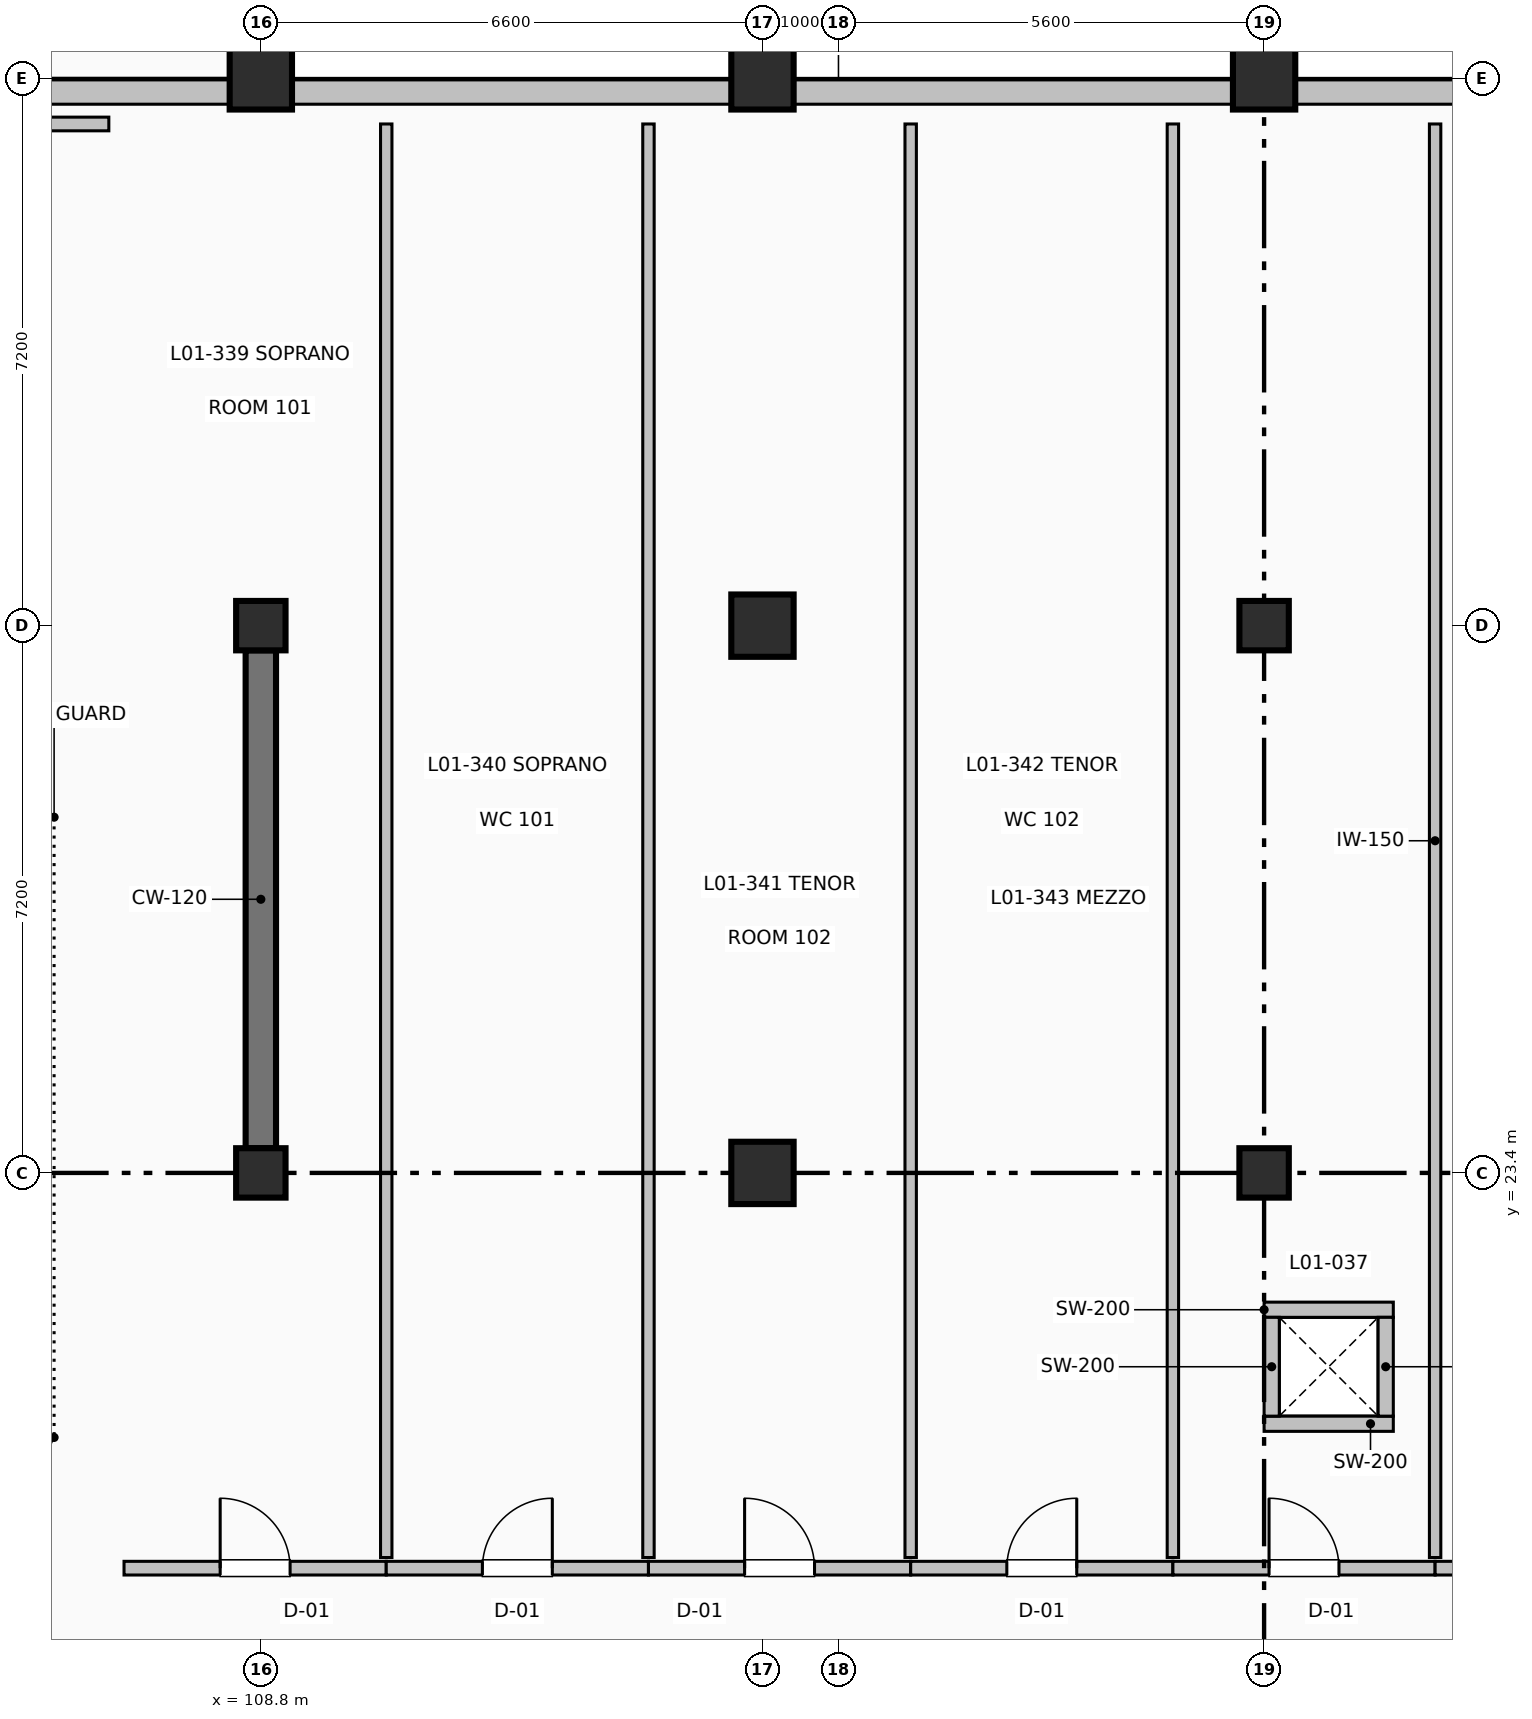
"""IFC4 building model, lengths in metres.
Left out: names, types, materials, properties, quantities, classifications, styles, units other than length and angle.
Written with IfcOpenShell. Run it as: python <this file> out.ifc"""

import sys

from ifc_helpers import new_model, si_unit, direction, frame, frame_2d, origin, origin_2d, place, context, subcontext, project, spatial, rectangle, extrude, element, fill, save


model = new_model("IFC4")
c1 = context("Model", 3, precision=1e-05, world=origin(), true_north=direction((0.0, 1.0)))
c2 = subcontext(c1, "Body", "Model", "MODEL_VIEW")
j1 = project(units=[si_unit("LENGTHUNIT", "METRE"), si_unit("PLANEANGLEUNIT", "RADIAN")], contexts=[c1])
p1 = place(None, origin())
s1 = spatial("IfcSite", under=j1, at=p1, CompositionType="ELEMENT")
p2 = place(p1, origin())
s2 = spatial("IfcBuilding", under=s1, at=p2, CompositionType="ELEMENT")
p3 = place(p2, frame((0.0, 0.0, 5.4)))
s3 = spatial("IfcBuildingStorey", under=s2, at=p3, CompositionType="ELEMENT", Elevation=5.4)
for number, where, z_axis, x_axis in (
    (1, (108.8, 23.4, 0.0), (0.0, 0.0, 1.0), (1.0, 0.0, 0.0)),
    (2, (108.8, 30.6, 0.0), (0.0, 0.0, 1.0), (1.0, 0.0, 0.0)),
):
    element("IfcColumn", number, at=place(p3, frame(where, z_axis=z_axis, x_axis=x_axis)), inside=s3, PredefinedType="COLUMN", context=c2, shape_type="SweptSolid", body=[
        extrude(rectangle(XDim=0.65, YDim=0.65, at=origin_2d()), origin(), (0.0, 0.0, 1.0), 4.8),
    ])
for number, where, z_axis, x_axis in (
    (3, (108.8, 37.8, 0.0), (0.0, 0.0, 1.0), (1.0, 0.0, 0.0)),
    (4, (115.4, 23.4, 0.0), (0.0, 0.0, 1.0), (1.0, 0.0, 0.0)),
    (5, (115.4, 30.6, 0.0), (0.0, 0.0, 1.0), (1.0, 0.0, 0.0)),
    (6, (115.4, 37.8, 0.0), (0.0, 0.0, 1.0), (1.0, 0.0, 0.0)),
):
    element("IfcColumn", number, at=place(p3, frame(where, z_axis=z_axis, x_axis=x_axis)), inside=s3, PredefinedType="COLUMN", context=c2, shape_type="SweptSolid", body=[
        extrude(rectangle(XDim=0.82, YDim=0.82, at=origin_2d()), origin(), (0.0, 0.0, 1.0), 4.8),
    ])
for number, where, z_axis, x_axis in (
    (7, (122.0, 23.4, 0.0), (0.0, 0.0, 1.0), (1.0, 0.0, 0.0)),
    (8, (122.0, 30.6, 0.0), (0.0, 0.0, 1.0), (1.0, 0.0, 0.0)),
):
    element("IfcColumn", number, at=place(p3, frame(where, z_axis=z_axis, x_axis=x_axis)), inside=s3, PredefinedType="COLUMN", context=c2, shape_type="SweptSolid", body=[
        extrude(rectangle(XDim=0.65, YDim=0.65, at=origin_2d()), origin(), (0.0, 0.0, 1.0), 4.8),
    ])
p4 = place(p3, frame((122.0, 37.8, 0.0), z_axis=(0.0, 0.0, 1.0), x_axis=(1.0, 0.0, 0.0)))
e9 = element("IfcColumn", 9, at=p4, inside=s3, PredefinedType="COLUMN", context=c2, shape_type="SweptSolid", body=[
    extrude(rectangle(XDim=0.82, YDim=0.82, at=origin_2d()), origin(), (0.0, 0.0, 1.0), 4.8),
])
p5 = place(p3, frame((108.8, 23.725, 0.0), z_axis=(0.0, 0.0, 1.0), x_axis=(0.0, 1.0, 0.0)))
e10 = element("IfcWall", 10, at=p5, inside=s3, PredefinedType="SHEAR", context=c2, shape_type="SweptSolid", body=[
    extrude(rectangle(XDim=6.55, YDim=0.4, at=frame_2d((3.275, 0.0))), origin(), (0.0, 0.0, 1.0), 4.48),
])
p6 = place(p3, frame((102.61, 37.62, 0.0), z_axis=(0.0, 0.0, 1.0), x_axis=(1.0, 0.0, 0.0)))
e11 = element("IfcWall", 11, at=p6, inside=s3, PredefinedType="SOLIDWALL", context=c2, shape_type="SweptSolid", body=[
    extrude(rectangle(XDim=5.78, YDim=0.32, at=frame_2d((2.89, 0.0))), origin(), (0.0, 0.0, 1.0), 3.742),
])
for number, where, z_axis, x_axis in (
    (12, (109.21, 37.62, 0.0), (0.0, 0.0, 1.0), (1.0, 0.0, 0.0)),
    (13, (115.81, 37.62, 0.0), (0.0, 0.0, 1.0), (1.0, 0.0, 0.0)),
    (14, (122.41, 37.62, 0.0), (0.0, 0.0, 1.0), (1.0, 0.0, 0.0)),
):
    element("IfcWall", number, at=place(p3, frame(where, z_axis=z_axis, x_axis=x_axis)), inside=s3, PredefinedType="SOLIDWALL", context=c2, shape_type="SweptSolid", body=[
        extrude(rectangle(XDim=5.78, YDim=0.32, at=frame_2d((2.89, 0.0))), origin(), (0.0, 0.0, 1.0), 3.742),
    ])
for number, where, z_axis, x_axis in (
    (15, (122.0, 20.1, 0.0), (0.0, 0.0, 1.0), (1.0, 0.0, 0.0)),
    (16, (123.7, 21.6, 0.0), (0.0, 0.0, 1.0), (-1.0, 0.0, 0.0)),
):
    element("IfcWall", number, at=place(p3, frame(where, z_axis=z_axis, x_axis=x_axis)), inside=s3, PredefinedType="PARTITIONING", context=c2, shape_type="SweptSolid", body=[
        extrude(rectangle(XDim=1.7, YDim=0.2, at=frame_2d((0.85, 0.0))), origin(), (0.0, 0.0, 1.0), 4.5),
    ])
p7 = place(p3, frame((122.1, 20.2, 0.0), z_axis=(0.0, 0.0, 1.0), x_axis=(0.0, 1.0, 0.0)))
e17 = element("IfcWall", 17, at=p7, inside=s3, PredefinedType="PARTITIONING", context=c2, shape_type="SweptSolid", body=[
    extrude(rectangle(XDim=1.3, YDim=0.2, at=frame_2d((0.65, 0.0))), origin(), (0.0, 0.0, 1.0), 3.742),
])
p8 = place(p3, frame((123.6, 21.5, 0.0), z_axis=(0.0, 0.0, 1.0), x_axis=(0.0, -1.0, 0.0)))
e18 = element("IfcWall", 18, at=p8, inside=s3, PredefinedType="PARTITIONING", context=c2, shape_type="SweptSolid", body=[
    extrude(rectangle(XDim=1.3, YDim=0.2, at=frame_2d((0.65, 0.0))), origin(), (0.0, 0.0, 1.0), 4.5),
])
p9 = place(p3, frame((89.6, 37.2, 0.0), z_axis=(0.0, 0.0, 1.0), x_axis=(1.0, 0.0, 0.0)))
e19 = element("IfcWall", 19, at=p9, inside=s3, PredefinedType="PARTITIONING", context=c2, shape_type="SweptSolid", body=[
    extrude(rectangle(XDim=17.2, YDim=0.18, at=frame_2d((8.6, 0.0))), origin(), (0.0, 0.0, 1.0), 4.492),
])
p10 = place(p3, frame((107.0, 18.2, 0.0), z_axis=(0.0, 0.0, 1.0), x_axis=(1.0, 0.0, 0.0)))
e20 = element("IfcWall", 20, at=p10, inside=s3, PredefinedType="PARTITIONING", context=c2, shape_type="SweptSolid", body=[
    extrude(rectangle(XDim=3.45, YDim=0.18, at=frame_2d((1.725, 0.0))), origin(), (0.0, 0.0, 1.0), 4.492),
])
p11 = place(p10, frame((1.265, 0.0, 0.0)))
e21 = element("IfcOpeningElement", 21, at=p11, cuts=e20, PredefinedType="OPENING", context=c2, shape_type="SweptSolid", body=[
    extrude(rectangle(XDim=0.92, YDim=2.05, at=frame_2d((0.46, 1.025))), frame((0.0, 0.1, 0.0), z_axis=(0.0, -1.0, 0.0), x_axis=(1.0, 0.0, 0.0)), (0.0, 0.0, 1.0), 0.2),
])
p12 = place(p3, frame((110.45, 18.34, 0.0), z_axis=(0.0, 0.0, 1.0), x_axis=(0.0, 1.0, 0.0)))
e22 = element("IfcWall", 22, at=p12, inside=s3, PredefinedType="PARTITIONING", context=c2, shape_type="SweptSolid", body=[
    extrude(rectangle(XDim=18.86, YDim=0.15, at=frame_2d((9.43, 0.0))), origin(), (0.0, 0.0, 1.0), 4.492),
])
p13 = place(p3, frame((110.45, 18.2, 0.0), z_axis=(0.0, 0.0, 1.0), x_axis=(1.0, 0.0, 0.0)))
e23 = element("IfcWall", 23, at=p13, inside=s3, PredefinedType="PARTITIONING", context=c2, shape_type="SweptSolid", body=[
    extrude(rectangle(XDim=3.45, YDim=0.18, at=frame_2d((1.725, 0.0))), origin(), (0.0, 0.0, 1.0), 4.492),
])
p14 = place(p13, frame((1.265, 0.0, 0.0)))
e24 = element("IfcOpeningElement", 24, at=p14, cuts=e23, PredefinedType="OPENING", context=c2, shape_type="SweptSolid", body=[
    extrude(rectangle(XDim=0.92, YDim=2.05, at=frame_2d((0.46, 1.025))), frame((0.0, 0.1, 0.0), z_axis=(0.0, -1.0, 0.0), x_axis=(1.0, 0.0, 0.0)), (0.0, 0.0, 1.0), 0.2),
])
p15 = place(p3, frame((113.9, 18.34, 0.0), z_axis=(0.0, 0.0, 1.0), x_axis=(0.0, 1.0, 0.0)))
e25 = element("IfcWall", 25, at=p15, inside=s3, PredefinedType="PARTITIONING", context=c2, shape_type="SweptSolid", body=[
    extrude(rectangle(XDim=18.86, YDim=0.15, at=frame_2d((9.43, 0.0))), origin(), (0.0, 0.0, 1.0), 4.492),
])
p16 = place(p3, frame((113.9, 18.2, 0.0), z_axis=(0.0, 0.0, 1.0), x_axis=(1.0, 0.0, 0.0)))
e26 = element("IfcWall", 26, at=p16, inside=s3, PredefinedType="PARTITIONING", context=c2, shape_type="SweptSolid", body=[
    extrude(rectangle(XDim=3.45, YDim=0.18, at=frame_2d((1.725, 0.0))), origin(), (0.0, 0.0, 1.0), 4.492),
])
p17 = place(p16, frame((1.265, 0.0, 0.0)))
e27 = element("IfcOpeningElement", 27, at=p17, cuts=e26, PredefinedType="OPENING", context=c2, shape_type="SweptSolid", body=[
    extrude(rectangle(XDim=0.92, YDim=2.05, at=frame_2d((0.46, 1.025))), frame((0.0, 0.1, 0.0), z_axis=(0.0, -1.0, 0.0), x_axis=(1.0, 0.0, 0.0)), (0.0, 0.0, 1.0), 0.2),
])
p18 = place(p3, frame((117.35, 18.34, 0.0), z_axis=(0.0, 0.0, 1.0), x_axis=(0.0, 1.0, 0.0)))
e28 = element("IfcWall", 28, at=p18, inside=s3, PredefinedType="PARTITIONING", context=c2, shape_type="SweptSolid", body=[
    extrude(rectangle(XDim=18.86, YDim=0.15, at=frame_2d((9.43, 0.0))), origin(), (0.0, 0.0, 1.0), 4.492),
])
p19 = place(p3, frame((117.35, 18.2, 0.0), z_axis=(0.0, 0.0, 1.0), x_axis=(1.0, 0.0, 0.0)))
e29 = element("IfcWall", 29, at=p19, inside=s3, PredefinedType="PARTITIONING", context=c2, shape_type="SweptSolid", body=[
    extrude(rectangle(XDim=3.45, YDim=0.18, at=frame_2d((1.725, 0.0))), origin(), (0.0, 0.0, 1.0), 4.492),
])
p20 = place(p19, frame((1.265, 0.0, 0.0)))
e30 = element("IfcOpeningElement", 30, at=p20, cuts=e29, PredefinedType="OPENING", context=c2, shape_type="SweptSolid", body=[
    extrude(rectangle(XDim=0.92, YDim=2.05, at=frame_2d((0.46, 1.025))), frame((0.0, 0.1, 0.0), z_axis=(0.0, -1.0, 0.0), x_axis=(1.0, 0.0, 0.0)), (0.0, 0.0, 1.0), 0.2),
])
p21 = place(p3, frame((120.8, 18.34, 0.0), z_axis=(0.0, 0.0, 1.0), x_axis=(0.0, 1.0, 0.0)))
e31 = element("IfcWall", 31, at=p21, inside=s3, PredefinedType="PARTITIONING", context=c2, shape_type="SweptSolid", body=[
    extrude(rectangle(XDim=18.86, YDim=0.15, at=frame_2d((9.43, 0.0))), origin(), (0.0, 0.0, 1.0), 4.492),
])
p22 = place(p3, frame((120.8, 18.2, 0.0), z_axis=(0.0, 0.0, 1.0), x_axis=(1.0, 0.0, 0.0)))
e32 = element("IfcWall", 32, at=p22, inside=s3, PredefinedType="PARTITIONING", context=c2, shape_type="SweptSolid", body=[
    extrude(rectangle(XDim=3.45, YDim=0.18, at=frame_2d((1.725, 0.0))), origin(), (0.0, 0.0, 1.0), 4.492),
])
p23 = place(p22, frame((1.265, 0.0, 0.0)))
e33 = element("IfcOpeningElement", 33, at=p23, cuts=e32, PredefinedType="OPENING", context=c2, shape_type="SweptSolid", body=[
    extrude(rectangle(XDim=0.92, YDim=2.05, at=frame_2d((0.46, 1.025))), frame((0.0, 0.1, 0.0), z_axis=(0.0, -1.0, 0.0), x_axis=(1.0, 0.0, 0.0)), (0.0, 0.0, 1.0), 0.2),
])
p24 = place(p3, frame((124.25, 18.34, 0.0), z_axis=(0.0, 0.0, 1.0), x_axis=(0.0, 1.0, 0.0)))
e34 = element("IfcWall", 34, at=p24, inside=s3, PredefinedType="PARTITIONING", context=c2, shape_type="SweptSolid", body=[
    extrude(rectangle(XDim=18.86, YDim=0.15, at=frame_2d((9.43, 0.0))), origin(), (0.0, 0.0, 1.0), 4.492),
])
p25 = place(p3, frame((124.25, 18.2, 0.0), z_axis=(0.0, 0.0, 1.0), x_axis=(1.0, 0.0, 0.0)))
e35 = element("IfcWall", 35, at=p25, inside=s3, PredefinedType="PARTITIONING", context=c2, shape_type="SweptSolid", body=[
    extrude(rectangle(XDim=3.45, YDim=0.18, at=frame_2d((1.725, 0.0))), origin(), (0.0, 0.0, 1.0), 4.492),
])
p26 = place(p25, frame((1.265, 0.0, 0.0)))
e36 = element("IfcOpeningElement", 36, at=p26, cuts=e35, PredefinedType="OPENING", context=c2, shape_type="SweptSolid", body=[
    extrude(rectangle(XDim=0.92, YDim=2.05, at=frame_2d((0.46, 1.025))), frame((0.0, 0.1, 0.0), z_axis=(0.0, -1.0, 0.0), x_axis=(1.0, 0.0, 0.0)), (0.0, 0.0, 1.0), 0.2),
])
p27 = place(p11, origin())
e37 = element("IfcDoor", 37, at=p27, inside=s3, OperationType="SINGLE_SWING_LEFT", PredefinedType="DOOR", context=c2, shape_type="SweptSolid", body=[
    extrude(rectangle(XDim=0.92, YDim=2.05, at=frame_2d((0.46, 1.025))), frame((0.0, 0.025, 0.0), z_axis=(0.0, -1.0, 0.0), x_axis=(1.0, 0.0, 0.0)), (0.0, 0.0, 1.0), 0.05),
])
fill(e21, e37)
p28 = place(p14, origin())
e38 = element("IfcDoor", 38, at=p28, inside=s3, OperationType="SINGLE_SWING_RIGHT", PredefinedType="DOOR", context=c2, shape_type="SweptSolid", body=[
    extrude(rectangle(XDim=0.92, YDim=2.05, at=frame_2d((0.46, 1.025))), frame((0.0, 0.025, 0.0), z_axis=(0.0, -1.0, 0.0), x_axis=(1.0, 0.0, 0.0)), (0.0, 0.0, 1.0), 0.05),
])
fill(e24, e38)
p29 = place(p17, origin())
e39 = element("IfcDoor", 39, at=p29, inside=s3, OperationType="SINGLE_SWING_LEFT", PredefinedType="DOOR", context=c2, shape_type="SweptSolid", body=[
    extrude(rectangle(XDim=0.92, YDim=2.05, at=frame_2d((0.46, 1.025))), frame((0.0, 0.025, 0.0), z_axis=(0.0, -1.0, 0.0), x_axis=(1.0, 0.0, 0.0)), (0.0, 0.0, 1.0), 0.05),
])
fill(e27, e39)
p30 = place(p20, origin())
e40 = element("IfcDoor", 40, at=p30, inside=s3, OperationType="SINGLE_SWING_RIGHT", PredefinedType="DOOR", context=c2, shape_type="SweptSolid", body=[
    extrude(rectangle(XDim=0.92, YDim=2.05, at=frame_2d((0.46, 1.025))), frame((0.0, 0.025, 0.0), z_axis=(0.0, -1.0, 0.0), x_axis=(1.0, 0.0, 0.0)), (0.0, 0.0, 1.0), 0.05),
])
fill(e30, e40)
p31 = place(p23, origin())
e41 = element("IfcDoor", 41, at=p31, inside=s3, OperationType="SINGLE_SWING_LEFT", PredefinedType="DOOR", context=c2, shape_type="SweptSolid", body=[
    extrude(rectangle(XDim=0.92, YDim=2.05, at=frame_2d((0.46, 1.025))), frame((0.0, 0.025, 0.0), z_axis=(0.0, -1.0, 0.0), x_axis=(1.0, 0.0, 0.0)), (0.0, 0.0, 1.0), 0.05),
])
fill(e33, e41)
save(model, sys.argv[1])
